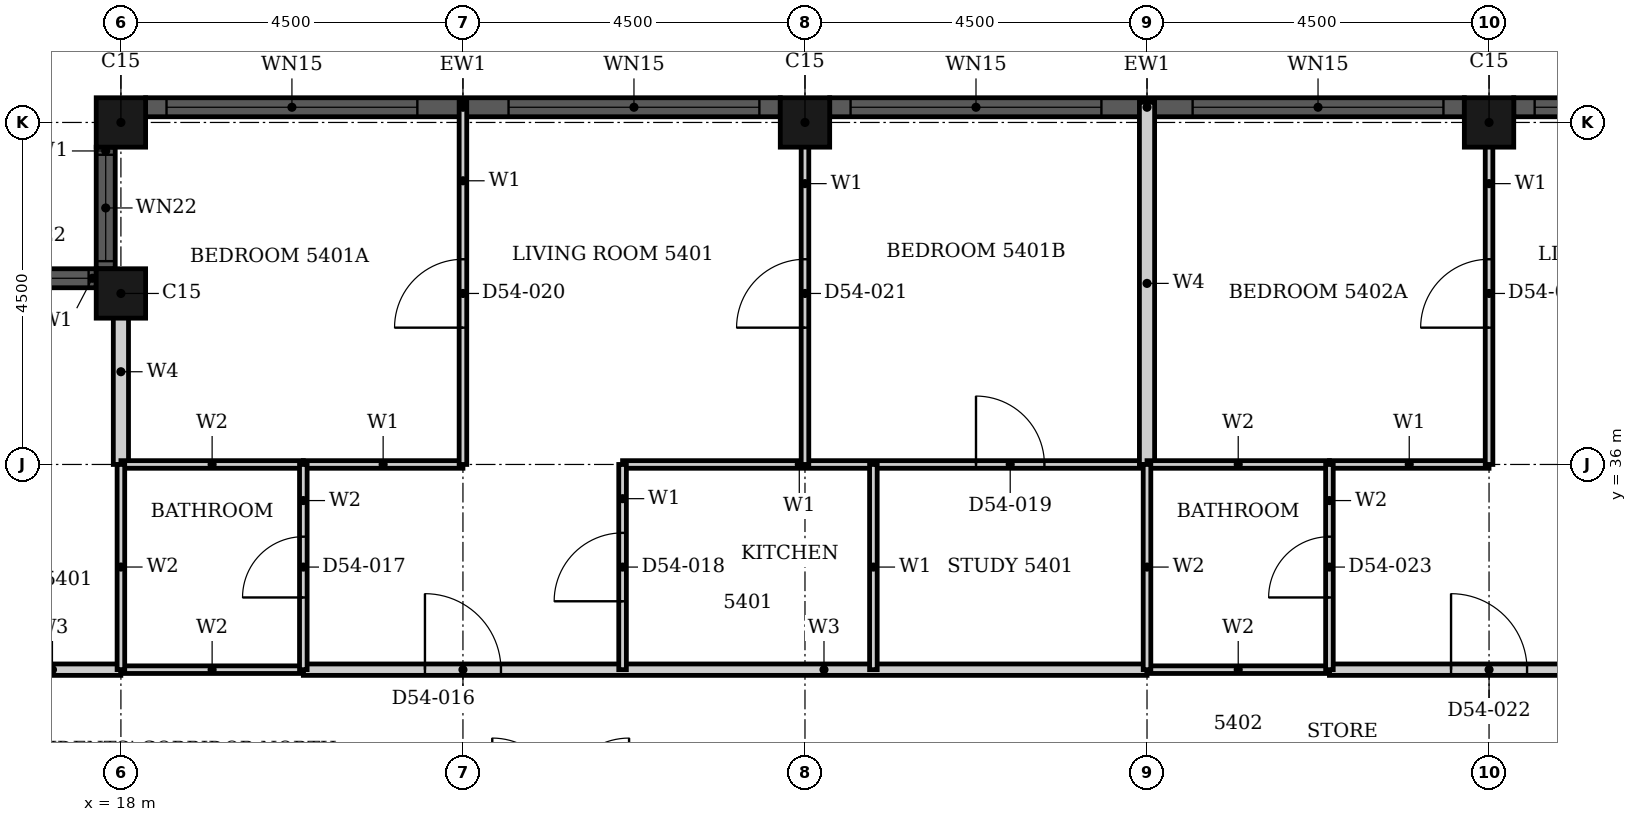
"""IFC4 building model, lengths in metres.
Left out: names, types, materials, properties, quantities, classifications, styles, units other than length and angle.
Written with IfcOpenShell. Run it as: python <this file> out.ifc"""

import sys

from ifc_helpers import new_model, si_unit, direction, frame, frame_2d, origin, origin_2d, place, context, subcontext, project, spatial, rectangle, hollow_rectangle, extrude, element, fill, save


model = new_model("IFC4")
c1 = context("Model", 3, precision=1e-05, world=origin(), true_north=direction((0.0, 1.0)))
c2 = subcontext(c1, "Body", "Model", "MODEL_VIEW")
j1 = project(units=[si_unit("LENGTHUNIT", "METRE"), si_unit("PLANEANGLEUNIT", "RADIAN")], contexts=[c1])
p1 = place(None, origin())
s1 = spatial("IfcSite", under=j1, at=p1, CompositionType="ELEMENT")
p2 = place(p1, origin())
s2 = spatial("IfcBuilding", under=s1, at=p2, CompositionType="ELEMENT")
p3 = place(p2, frame((0.0, 0.0, 214.6)))
s3 = spatial("IfcBuildingStorey", under=s2, at=p3, CompositionType="ELEMENT", Elevation=214.6)
for number, where, z_axis, x_axis in (
    (1, (36.0, 40.5, 0.0), (0.0, 0.0, 1.0), (1.0, 0.0, 0.0)),
    (2, (27.0, 40.5, 0.0), (0.0, 0.0, 1.0), (1.0, 0.0, 0.0)),
    (3, (18.0, 40.5, 0.0), (0.0, 0.0, 1.0), (1.0, 0.0, 0.0)),
    (4, (18.0, 38.25, 0.0), (0.0, 0.0, 1.0), (1.0, 0.0, 0.0)),
):
    element("IfcColumn", number, at=place(p3, frame(where, z_axis=z_axis, x_axis=x_axis)), inside=s3, PredefinedType="COLUMN", context=c2, shape_type="SweptSolid", body=[
        extrude(hollow_rectangle(XDim=0.65, YDim=0.65, WallThickness=0.021, at=origin_2d()), origin(), (0.0, 0.0, 1.0), 3.7),
    ])
p4 = place(p3, frame((44.675, 40.7, 0.0), z_axis=(0.0, 0.0, 1.0), x_axis=(-1.0, 0.0, 0.0)))
e5 = element("IfcWall", 5, at=p4, inside=s3, PredefinedType="SOLIDWALL", context=c2, shape_type="SweptSolid", body=[
    extrude(rectangle(XDim=8.35, YDim=0.25, at=frame_2d((4.175, 0.0))), origin(), (0.0, 0.0, 1.0), 3.7),
])
p5 = place(p4, frame((0.275, 0.0, 0.45)))
e6 = element("IfcOpeningElement", 6, at=p5, cuts=e5, PredefinedType="OPENING", context=c2, shape_type="SweptSolid", body=[
    extrude(rectangle(XDim=3.3, YDim=2.3, at=frame_2d((1.65, 1.15))), frame((0.0, 0.135, 0.0), z_axis=(0.0, -1.0, 0.0), x_axis=(1.0, 0.0, 0.0)), (0.0, 0.0, 1.0), 0.27),
])
p6 = place(p4, frame((4.775, 0.0, 0.45)))
e7 = element("IfcOpeningElement", 7, at=p6, cuts=e5, PredefinedType="OPENING", context=c2, shape_type="SweptSolid", body=[
    extrude(rectangle(XDim=3.3, YDim=2.3, at=frame_2d((1.65, 1.15))), frame((0.0, 0.135, 0.0), z_axis=(0.0, -1.0, 0.0), x_axis=(1.0, 0.0, 0.0)), (0.0, 0.0, 1.0), 0.27),
])
p7 = place(p3, frame((35.675, 40.7, 0.0), z_axis=(0.0, 0.0, 1.0), x_axis=(-1.0, 0.0, 0.0)))
e8 = element("IfcWall", 8, at=p7, inside=s3, PredefinedType="SOLIDWALL", context=c2, shape_type="SweptSolid", body=[
    extrude(rectangle(XDim=8.35, YDim=0.25, at=frame_2d((4.175, 0.0))), origin(), (0.0, 0.0, 1.0), 3.7),
])
p8 = place(p7, frame((0.275, 0.0, 0.45)))
e9 = element("IfcOpeningElement", 9, at=p8, cuts=e8, PredefinedType="OPENING", context=c2, shape_type="SweptSolid", body=[
    extrude(rectangle(XDim=3.3, YDim=2.3, at=frame_2d((1.65, 1.15))), frame((0.0, 0.135, 0.0), z_axis=(0.0, -1.0, 0.0), x_axis=(1.0, 0.0, 0.0)), (0.0, 0.0, 1.0), 0.27),
])
p9 = place(p7, frame((4.775, 0.0, 0.45)))
e10 = element("IfcOpeningElement", 10, at=p9, cuts=e8, PredefinedType="OPENING", context=c2, shape_type="SweptSolid", body=[
    extrude(rectangle(XDim=3.3, YDim=2.3, at=frame_2d((1.65, 1.15))), frame((0.0, 0.135, 0.0), z_axis=(0.0, -1.0, 0.0), x_axis=(1.0, 0.0, 0.0)), (0.0, 0.0, 1.0), 0.27),
])
p10 = place(p3, frame((26.675, 40.7, 0.0), z_axis=(0.0, 0.0, 1.0), x_axis=(-1.0, 0.0, 0.0)))
e11 = element("IfcWall", 11, at=p10, inside=s3, PredefinedType="SOLIDWALL", context=c2, shape_type="SweptSolid", body=[
    extrude(rectangle(XDim=8.35, YDim=0.25, at=frame_2d((4.175, 0.0))), origin(), (0.0, 0.0, 1.0), 3.7),
])
p11 = place(p10, frame((0.275, 0.0, 0.45)))
e12 = element("IfcOpeningElement", 12, at=p11, cuts=e11, PredefinedType="OPENING", context=c2, shape_type="SweptSolid", body=[
    extrude(rectangle(XDim=3.3, YDim=2.3, at=frame_2d((1.65, 1.15))), frame((0.0, 0.135, 0.0), z_axis=(0.0, -1.0, 0.0), x_axis=(1.0, 0.0, 0.0)), (0.0, 0.0, 1.0), 0.27),
])
p12 = place(p10, frame((4.775, 0.0, 0.45)))
e13 = element("IfcOpeningElement", 13, at=p12, cuts=e11, PredefinedType="OPENING", context=c2, shape_type="SweptSolid", body=[
    extrude(rectangle(XDim=3.3, YDim=2.3, at=frame_2d((1.65, 1.15))), frame((0.0, 0.135, 0.0), z_axis=(0.0, -1.0, 0.0), x_axis=(1.0, 0.0, 0.0)), (0.0, 0.0, 1.0), 0.27),
])
p13 = place(p3, frame((17.8, 40.175, 0.0), z_axis=(0.0, 0.0, 1.0), x_axis=(0.0, -1.0, 0.0)))
e14 = element("IfcWall", 14, at=p13, inside=s3, PredefinedType="SOLIDWALL", context=c2, shape_type="SweptSolid", body=[
    extrude(rectangle(XDim=1.6, YDim=0.25, at=frame_2d((0.8, 0.0))), origin(), (0.0, 0.0, 1.0), 3.7),
])
p14 = place(p13, frame((0.1, 0.0, 0.9)))
e15 = element("IfcOpeningElement", 15, at=p14, cuts=e14, PredefinedType="OPENING", context=c2, shape_type="SweptSolid", body=[
    extrude(rectangle(XDim=1.4, YDim=1.85, at=frame_2d((0.7, 0.925))), frame((0.0, 0.135, 0.0), z_axis=(0.0, -1.0, 0.0), x_axis=(1.0, 0.0, 0.0)), (0.0, 0.0, 1.0), 0.27),
])
p15 = place(p3, frame((17.675, 38.45, 0.0), z_axis=(0.0, 0.0, 1.0), x_axis=(-1.0, 0.0, 0.0)))
e16 = element("IfcWall", 16, at=p15, inside=s3, PredefinedType="SOLIDWALL", context=c2, shape_type="SweptSolid", body=[
    extrude(rectangle(XDim=1.6, YDim=0.25, at=frame_2d((0.8, 0.0))), origin(), (0.0, 0.0, 1.0), 3.7),
])
p16 = place(p15, frame((0.1, 0.0, 0.9)))
e17 = element("IfcOpeningElement", 17, at=p16, cuts=e16, PredefinedType="OPENING", context=c2, shape_type="SweptSolid", body=[
    extrude(rectangle(XDim=1.4, YDim=1.85, at=frame_2d((0.7, 0.925))), frame((0.0, 0.135, 0.0), z_axis=(0.0, -1.0, 0.0), x_axis=(1.0, 0.0, 0.0)), (0.0, 0.0, 1.0), 0.27),
])
p17 = place(p3, frame((20.4, 33.3, 0.0), z_axis=(0.0, 0.0, 1.0), x_axis=(1.0, 0.0, 0.0)))
e18 = element("IfcWall", 18, at=p17, inside=s3, PredefinedType="PARTITIONING", context=c2, shape_type="SweptSolid", body=[
    extrude(rectangle(XDim=11.1, YDim=0.15, at=frame_2d((5.55, 0.0))), origin(), (0.0, 0.0, 1.0), 3.4),
])
p18 = place(p17, frame((1.6, 0.0, 0.0)))
e19 = element("IfcOpeningElement", 19, at=p18, cuts=e18, PredefinedType="OPENING", context=c2, shape_type="SweptSolid", body=[
    extrude(rectangle(XDim=1.0, YDim=2.2, at=frame_2d((0.5, 1.1))), frame((0.0, 0.085, 0.0), z_axis=(0.0, -1.0, 0.0), x_axis=(1.0, 0.0, 0.0)), (0.0, 0.0, 1.0), 0.17),
])
p19 = place(p3, frame((33.9, 33.3, 0.0), z_axis=(0.0, 0.0, 1.0), x_axis=(1.0, 0.0, 0.0)))
e20 = element("IfcWall", 20, at=p19, inside=s3, PredefinedType="PARTITIONING", context=c2, shape_type="SweptSolid", body=[
    extrude(rectangle(XDim=11.1, YDim=0.15, at=frame_2d((5.55, 0.0))), origin(), (0.0, 0.0, 1.0), 3.4),
])
p20 = place(p19, frame((1.6, 0.0, 0.0)))
e21 = element("IfcOpeningElement", 21, at=p20, cuts=e20, PredefinedType="OPENING", context=c2, shape_type="SweptSolid", body=[
    extrude(rectangle(XDim=1.0, YDim=2.2, at=frame_2d((0.5, 1.1))), frame((0.0, 0.085, 0.0), z_axis=(0.0, -1.0, 0.0), x_axis=(1.0, 0.0, 0.0)), (0.0, 0.0, 1.0), 0.17),
])
p21 = place(p3, frame((16.2, 33.3, 0.0), z_axis=(0.0, 0.0, 1.0), x_axis=(1.0, 0.0, 0.0)))
e22 = element("IfcWall", 22, at=p21, inside=s3, PredefinedType="PARTITIONING", context=c2, shape_type="SweptSolid", body=[
    extrude(rectangle(XDim=1.799, YDim=0.15, at=frame_2d((0.899, 0.0))), origin(), (0.0, 0.0, 1.0), 3.4),
])
p22 = place(p3, frame((20.4, 36.0, 0.0), z_axis=(0.0, 0.0, 1.0), x_axis=(1.0, 0.0, 0.0)))
e23 = element("IfcWall", 23, at=p22, inside=s3, PredefinedType="PARTITIONING", context=c2, shape_type="SweptSolid", body=[
    extrude(rectangle(XDim=2.1, YDim=0.1, at=frame_2d((1.05, 0.0))), origin(), (0.0, 0.0, 1.0), 3.4),
])
p23 = place(p3, frame((24.6, 36.0, 0.0), z_axis=(0.0, 0.0, 1.0), x_axis=(1.0, 0.0, 0.0)))
e24 = element("IfcWall", 24, at=p23, inside=s3, PredefinedType="PARTITIONING", context=c2, shape_type="SweptSolid", body=[
    extrude(rectangle(XDim=6.9, YDim=0.1, at=frame_2d((3.45, 0.0))), origin(), (0.0, 0.0, 1.0), 3.4),
])
p24 = place(p23, frame((4.65, 0.0, 0.0)))
e25 = element("IfcOpeningElement", 25, at=p24, cuts=e24, PredefinedType="OPENING", context=c2, shape_type="SweptSolid", body=[
    extrude(rectangle(XDim=0.9, YDim=2.1, at=frame_2d((0.45, 1.05))), frame((0.0, 0.06, 0.0), z_axis=(0.0, -1.0, 0.0), x_axis=(1.0, 0.0, 0.0)), (0.0, 0.0, 1.0), 0.12),
])
p25 = place(p3, frame((33.9, 36.0, 0.0), z_axis=(0.0, 0.0, 1.0), x_axis=(1.0, 0.0, 0.0)))
e26 = element("IfcWall", 26, at=p25, inside=s3, PredefinedType="PARTITIONING", context=c2, shape_type="SweptSolid", body=[
    extrude(rectangle(XDim=2.1, YDim=0.1, at=frame_2d((1.05, 0.0))), origin(), (0.0, 0.0, 1.0), 3.4),
])
p26 = place(p3, frame((22.5, 36.0, 0.0), z_axis=(0.0, 0.0, 1.0), x_axis=(0.0, 1.0, 0.0)))
e27 = element("IfcWall", 27, at=p26, inside=s3, PredefinedType="PARTITIONING", context=c2, shape_type="SweptSolid", body=[
    extrude(rectangle(XDim=4.765, YDim=0.1, at=frame_2d((2.382, 0.0))), origin(), (0.0, 0.0, 1.0), 3.4),
])
p27 = place(p26, frame((1.8, 0.0, 0.0)))
e28 = element("IfcOpeningElement", 28, at=p27, cuts=e27, PredefinedType="OPENING", context=c2, shape_type="SweptSolid", body=[
    extrude(rectangle(XDim=0.9, YDim=2.1, at=frame_2d((0.45, 1.05))), frame((0.0, 0.06, 0.0), z_axis=(0.0, -1.0, 0.0), x_axis=(1.0, 0.0, 0.0)), (0.0, 0.0, 1.0), 0.12),
])
p28 = place(p3, frame((24.6, 33.3, 0.0), z_axis=(0.0, 0.0, 1.0), x_axis=(0.0, 1.0, 0.0)))
e29 = element("IfcWall", 29, at=p28, inside=s3, PredefinedType="PARTITIONING", context=c2, shape_type="SweptSolid", body=[
    extrude(rectangle(XDim=2.7, YDim=0.1, at=frame_2d((1.35, 0.0))), origin(), (0.0, 0.0, 1.0), 3.4),
])
p29 = place(p28, frame((0.9, 0.0, 0.0)))
e30 = element("IfcOpeningElement", 30, at=p29, cuts=e29, PredefinedType="OPENING", context=c2, shape_type="SweptSolid", body=[
    extrude(rectangle(XDim=0.9, YDim=2.1, at=frame_2d((0.45, 1.05))), frame((0.0, 0.06, 0.0), z_axis=(0.0, -1.0, 0.0), x_axis=(1.0, 0.0, 0.0)), (0.0, 0.0, 1.0), 0.12),
])
p30 = place(p3, frame((27.0, 36.0, 0.0), z_axis=(0.0, 0.0, 1.0), x_axis=(0.0, 1.0, 0.0)))
e31 = element("IfcWall", 31, at=p30, inside=s3, PredefinedType="PARTITIONING", context=c2, shape_type="SweptSolid", body=[
    extrude(rectangle(XDim=4.69, YDim=0.1, at=frame_2d((2.345, 0.0))), origin(), (0.0, 0.0, 1.0), 3.4),
])
p31 = place(p30, frame((1.8, 0.0, 0.0)))
e32 = element("IfcOpeningElement", 32, at=p31, cuts=e31, PredefinedType="OPENING", context=c2, shape_type="SweptSolid", body=[
    extrude(rectangle(XDim=0.9, YDim=2.1, at=frame_2d((0.45, 1.05))), frame((0.0, 0.06, 0.0), z_axis=(0.0, -1.0, 0.0), x_axis=(1.0, 0.0, 0.0)), (0.0, 0.0, 1.0), 0.12),
])
p32 = place(p3, frame((27.9, 33.3, 0.0), z_axis=(0.0, 0.0, 1.0), x_axis=(0.0, 1.0, 0.0)))
e33 = element("IfcWall", 33, at=p32, inside=s3, PredefinedType="PARTITIONING", context=c2, shape_type="SweptSolid", body=[
    extrude(rectangle(XDim=2.7, YDim=0.1, at=frame_2d((1.35, 0.0))), origin(), (0.0, 0.0, 1.0), 3.4),
])
p33 = place(p3, frame((36.0, 36.0, 0.0), z_axis=(0.0, 0.0, 1.0), x_axis=(0.0, 1.0, 0.0)))
e34 = element("IfcWall", 34, at=p33, inside=s3, PredefinedType="PARTITIONING", context=c2, shape_type="SweptSolid", body=[
    extrude(rectangle(XDim=4.69, YDim=0.1, at=frame_2d((2.345, 0.0))), origin(), (0.0, 0.0, 1.0), 3.4),
])
p34 = place(p33, frame((1.8, 0.0, 0.0)))
e35 = element("IfcOpeningElement", 35, at=p34, cuts=e34, PredefinedType="OPENING", context=c2, shape_type="SweptSolid", body=[
    extrude(rectangle(XDim=0.9, YDim=2.1, at=frame_2d((0.45, 1.05))), frame((0.0, 0.06, 0.0), z_axis=(0.0, -1.0, 0.0), x_axis=(1.0, 0.0, 0.0)), (0.0, 0.0, 1.0), 0.12),
])
p35 = place(p3, frame((18.0, 36.0, 0.0), z_axis=(0.0, 0.0, 1.0), x_axis=(0.0, 1.0, 0.0)))
e36 = element("IfcWall", 36, at=p35, inside=s3, PredefinedType="PARTITIONING", context=c2, shape_type="SweptSolid", body=[
    extrude(rectangle(XDim=2.44, YDim=0.2, at=frame_2d((1.22, 0.0))), origin(), (0.0, 0.0, 1.0), 3.4),
])
p36 = place(p3, frame((31.5, 36.0, 0.0), z_axis=(0.0, 0.0, 1.0), x_axis=(0.0, 1.0, 0.0)))
e37 = element("IfcWall", 37, at=p36, inside=s3, PredefinedType="PARTITIONING", context=c2, shape_type="SweptSolid", body=[
    extrude(rectangle(XDim=4.765, YDim=0.2, at=frame_2d((2.382, 0.0))), origin(), (0.0, 0.0, 1.0), 3.4),
])
for number, where, z_axis, x_axis in (
    (38, (18.0, 33.3, 0.0), (0.0, 0.0, 1.0), (1.0, 0.0, 0.0)),
    (39, (31.5, 33.3, 0.0), (0.0, 0.0, 1.0), (1.0, 0.0, 0.0)),
    (40, (18.0, 36.0, 0.0), (0.0, 0.0, 1.0), (1.0, 0.0, 0.0)),
    (41, (31.5, 36.0, 0.0), (0.0, 0.0, 1.0), (1.0, 0.0, 0.0)),
):
    element("IfcWall", number, at=place(p3, frame(where, z_axis=z_axis, x_axis=x_axis)), inside=s3, PredefinedType="PARTITIONING", context=c2, shape_type="SweptSolid", body=[
        extrude(rectangle(XDim=2.4, YDim=0.1, at=frame_2d((1.2, 0.0))), origin(), (0.0, 0.0, 1.0), 3.4),
    ])
p37 = place(p3, frame((18.0, 33.301, 0.0), z_axis=(0.0, 0.0, 1.0), x_axis=(0.0, 1.0, 0.0)))
e42 = element("IfcWall", 42, at=p37, inside=s3, PredefinedType="PARTITIONING", context=c2, shape_type="SweptSolid", body=[
    extrude(rectangle(XDim=2.699, YDim=0.1, at=frame_2d((1.35, 0.0))), origin(), (0.0, 0.0, 1.0), 3.4),
])
p38 = place(p3, frame((20.4, 33.3, 0.0), z_axis=(0.0, 0.0, 1.0), x_axis=(0.0, 1.0, 0.0)))
e43 = element("IfcWall", 43, at=p38, inside=s3, PredefinedType="PARTITIONING", context=c2, shape_type="SweptSolid", body=[
    extrude(rectangle(XDim=2.7, YDim=0.1, at=frame_2d((1.35, 0.0))), origin(), (0.0, 0.0, 1.0), 3.4),
])
p39 = place(p38, frame((0.95, 0.0, 0.0)))
e44 = element("IfcOpeningElement", 44, at=p39, cuts=e43, PredefinedType="OPENING", context=c2, shape_type="SweptSolid", body=[
    extrude(rectangle(XDim=0.8, YDim=2.1, at=frame_2d((0.4, 1.05))), frame((0.0, 0.06, 0.0), z_axis=(0.0, -1.0, 0.0), x_axis=(1.0, 0.0, 0.0)), (0.0, 0.0, 1.0), 0.12),
])
p40 = place(p3, frame((31.5, 33.3, 0.0), z_axis=(0.0, 0.0, 1.0), x_axis=(0.0, 1.0, 0.0)))
e45 = element("IfcWall", 45, at=p40, inside=s3, PredefinedType="PARTITIONING", context=c2, shape_type="SweptSolid", body=[
    extrude(rectangle(XDim=2.7, YDim=0.1, at=frame_2d((1.35, 0.0))), origin(), (0.0, 0.0, 1.0), 3.4),
])
p41 = place(p3, frame((33.9, 33.3, 0.0), z_axis=(0.0, 0.0, 1.0), x_axis=(0.0, 1.0, 0.0)))
e46 = element("IfcWall", 46, at=p41, inside=s3, PredefinedType="PARTITIONING", context=c2, shape_type="SweptSolid", body=[
    extrude(rectangle(XDim=2.7, YDim=0.1, at=frame_2d((1.35, 0.0))), origin(), (0.0, 0.0, 1.0), 3.4),
])
p42 = place(p41, frame((0.95, 0.0, 0.0)))
e47 = element("IfcOpeningElement", 47, at=p42, cuts=e46, PredefinedType="OPENING", context=c2, shape_type="SweptSolid", body=[
    extrude(rectangle(XDim=0.8, YDim=2.1, at=frame_2d((0.4, 1.05))), frame((0.0, 0.06, 0.0), z_axis=(0.0, -1.0, 0.0), x_axis=(1.0, 0.0, 0.0)), (0.0, 0.0, 1.0), 0.12),
])
p43 = place(p6, origin())
e48 = element("IfcWindow", 48, at=p43, inside=s3, PartitioningType="SINGLE_PANEL", PredefinedType="WINDOW", context=c2, shape_type="SweptSolid", body=[
    extrude(rectangle(XDim=3.3, YDim=2.3, at=frame_2d((1.65, 1.15))), frame((0.0, 0.03, 0.0), z_axis=(0.0, -1.0, 0.0), x_axis=(1.0, 0.0, 0.0)), (0.0, 0.0, 1.0), 0.06),
])
fill(e7, e48)
p44 = place(p8, origin())
e49 = element("IfcWindow", 49, at=p44, inside=s3, PartitioningType="SINGLE_PANEL", PredefinedType="WINDOW", context=c2, shape_type="SweptSolid", body=[
    extrude(rectangle(XDim=3.3, YDim=2.3, at=frame_2d((1.65, 1.15))), frame((0.0, 0.03, 0.0), z_axis=(0.0, -1.0, 0.0), x_axis=(1.0, 0.0, 0.0)), (0.0, 0.0, 1.0), 0.06),
])
fill(e9, e49)
p45 = place(p9, origin())
e50 = element("IfcWindow", 50, at=p45, inside=s3, PartitioningType="SINGLE_PANEL", PredefinedType="WINDOW", context=c2, shape_type="SweptSolid", body=[
    extrude(rectangle(XDim=3.3, YDim=2.3, at=frame_2d((1.65, 1.15))), frame((0.0, 0.03, 0.0), z_axis=(0.0, -1.0, 0.0), x_axis=(1.0, 0.0, 0.0)), (0.0, 0.0, 1.0), 0.06),
])
fill(e10, e50)
p46 = place(p11, origin())
e51 = element("IfcWindow", 51, at=p46, inside=s3, PartitioningType="SINGLE_PANEL", PredefinedType="WINDOW", context=c2, shape_type="SweptSolid", body=[
    extrude(rectangle(XDim=3.3, YDim=2.3, at=frame_2d((1.65, 1.15))), frame((0.0, 0.03, 0.0), z_axis=(0.0, -1.0, 0.0), x_axis=(1.0, 0.0, 0.0)), (0.0, 0.0, 1.0), 0.06),
])
fill(e12, e51)
p47 = place(p12, origin())
e52 = element("IfcWindow", 52, at=p47, inside=s3, PartitioningType="SINGLE_PANEL", PredefinedType="WINDOW", context=c2, shape_type="SweptSolid", body=[
    extrude(rectangle(XDim=3.3, YDim=2.3, at=frame_2d((1.65, 1.15))), frame((0.0, 0.03, 0.0), z_axis=(0.0, -1.0, 0.0), x_axis=(1.0, 0.0, 0.0)), (0.0, 0.0, 1.0), 0.06),
])
fill(e13, e52)
p48 = place(p14, origin())
e53 = element("IfcWindow", 53, at=p48, inside=s3, PartitioningType="SINGLE_PANEL", PredefinedType="WINDOW", context=c2, shape_type="SweptSolid", body=[
    extrude(rectangle(XDim=1.4, YDim=1.85, at=frame_2d((0.7, 0.925))), frame((0.0, 0.03, 0.0), z_axis=(0.0, -1.0, 0.0), x_axis=(1.0, 0.0, 0.0)), (0.0, 0.0, 1.0), 0.06),
])
fill(e15, e53)
p49 = place(p16, origin())
e54 = element("IfcWindow", 54, at=p49, inside=s3, PartitioningType="SINGLE_PANEL", PredefinedType="WINDOW", context=c2, shape_type="SweptSolid", body=[
    extrude(rectangle(XDim=1.4, YDim=1.85, at=frame_2d((0.7, 0.925))), frame((0.0, 0.03, 0.0), z_axis=(0.0, -1.0, 0.0), x_axis=(1.0, 0.0, 0.0)), (0.0, 0.0, 1.0), 0.06),
])
fill(e17, e54)
p50 = place(p18, origin())
e55 = element("IfcDoor", 55, at=p50, inside=s3, OperationType="SINGLE_SWING_LEFT", PredefinedType="DOOR", context=c2, shape_type="SweptSolid", body=[
    extrude(rectangle(XDim=1.0, YDim=2.2, at=frame_2d((0.5, 1.1))), frame((0.0, 0.025, 0.0), z_axis=(0.0, -1.0, 0.0), x_axis=(1.0, 0.0, 0.0)), (0.0, 0.0, 1.0), 0.05),
])
fill(e19, e55)
p51 = place(p39, origin())
e56 = element("IfcDoor", 56, at=p51, inside=s3, OperationType="SINGLE_SWING_RIGHT", PredefinedType="DOOR", context=c2, shape_type="SweptSolid", body=[
    extrude(rectangle(XDim=0.8, YDim=2.1, at=frame_2d((0.4, 1.05))), frame((0.0, 0.025, 0.0), z_axis=(0.0, -1.0, 0.0), x_axis=(1.0, 0.0, 0.0)), (0.0, 0.0, 1.0), 0.05),
])
fill(e44, e56)
p52 = place(p29, origin())
e57 = element("IfcDoor", 57, at=p52, inside=s3, OperationType="SINGLE_SWING_RIGHT", PredefinedType="DOOR", context=c2, shape_type="SweptSolid", body=[
    extrude(rectangle(XDim=0.9, YDim=2.1, at=frame_2d((0.45, 1.05))), frame((0.0, 0.025, 0.0), z_axis=(0.0, -1.0, 0.0), x_axis=(1.0, 0.0, 0.0)), (0.0, 0.0, 1.0), 0.05),
])
fill(e30, e57)
p53 = place(p24, origin())
e58 = element("IfcDoor", 58, at=p53, inside=s3, OperationType="SINGLE_SWING_RIGHT", PredefinedType="DOOR", context=c2, shape_type="SweptSolid", body=[
    extrude(rectangle(XDim=0.9, YDim=2.1, at=frame_2d((0.45, 1.05))), frame((0.0, 0.025, 0.0), z_axis=(0.0, -1.0, 0.0), x_axis=(1.0, 0.0, 0.0)), (0.0, 0.0, 1.0), 0.05),
])
fill(e25, e58)
p54 = place(p27, origin())
e59 = element("IfcDoor", 59, at=p54, inside=s3, OperationType="SINGLE_SWING_LEFT", PredefinedType="DOOR", context=c2, shape_type="SweptSolid", body=[
    extrude(rectangle(XDim=0.9, YDim=2.1, at=frame_2d((0.45, 1.05))), frame((0.0, 0.025, 0.0), z_axis=(0.0, -1.0, 0.0), x_axis=(1.0, 0.0, 0.0)), (0.0, 0.0, 1.0), 0.05),
])
fill(e28, e59)
p55 = place(p31, origin())
e60 = element("IfcDoor", 60, at=p55, inside=s3, OperationType="SINGLE_SWING_RIGHT", PredefinedType="DOOR", context=c2, shape_type="SweptSolid", body=[
    extrude(rectangle(XDim=0.9, YDim=2.1, at=frame_2d((0.45, 1.05))), frame((0.0, 0.025, 0.0), z_axis=(0.0, -1.0, 0.0), x_axis=(1.0, 0.0, 0.0)), (0.0, 0.0, 1.0), 0.05),
])
fill(e32, e60)
p56 = place(p20, origin())
e61 = element("IfcDoor", 61, at=p56, inside=s3, OperationType="SINGLE_SWING_LEFT", PredefinedType="DOOR", context=c2, shape_type="SweptSolid", body=[
    extrude(rectangle(XDim=1.0, YDim=2.2, at=frame_2d((0.5, 1.1))), frame((0.0, 0.025, 0.0), z_axis=(0.0, -1.0, 0.0), x_axis=(1.0, 0.0, 0.0)), (0.0, 0.0, 1.0), 0.05),
])
fill(e21, e61)
p57 = place(p42, origin())
e62 = element("IfcDoor", 62, at=p57, inside=s3, OperationType="SINGLE_SWING_LEFT", PredefinedType="DOOR", context=c2, shape_type="SweptSolid", body=[
    extrude(rectangle(XDim=0.8, YDim=2.1, at=frame_2d((0.4, 1.05))), frame((0.0, 0.025, 0.0), z_axis=(0.0, -1.0, 0.0), x_axis=(1.0, 0.0, 0.0)), (0.0, 0.0, 1.0), 0.05),
])
fill(e47, e62)
p58 = place(p34, origin())
e63 = element("IfcDoor", 63, at=p58, inside=s3, OperationType="SINGLE_SWING_RIGHT", PredefinedType="DOOR", context=c2, shape_type="SweptSolid", body=[
    extrude(rectangle(XDim=0.9, YDim=2.1, at=frame_2d((0.45, 1.05))), frame((0.0, 0.025, 0.0), z_axis=(0.0, -1.0, 0.0), x_axis=(1.0, 0.0, 0.0)), (0.0, 0.0, 1.0), 0.05),
])
fill(e35, e63)
save(model, sys.argv[1])
